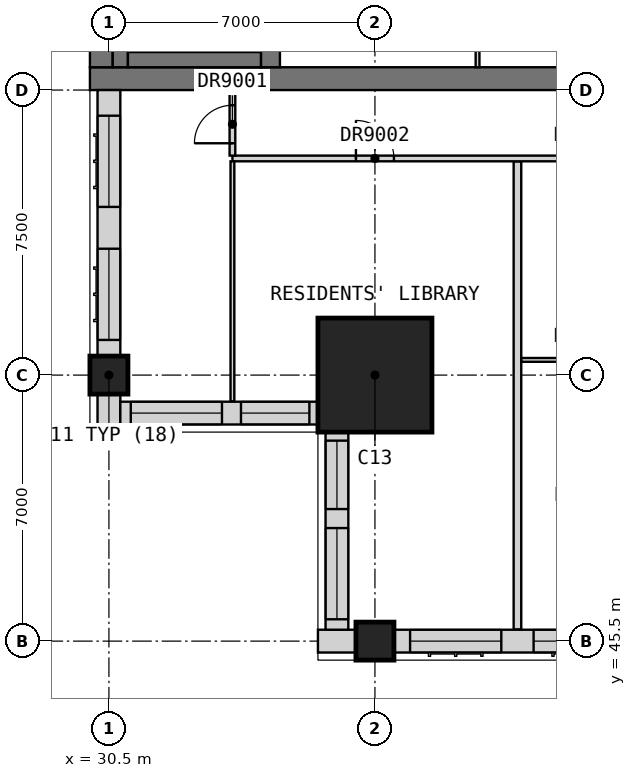
"""IFC4 building model, lengths in metres.
Left out: names, types, materials, properties, quantities, classifications, styles, units other than length and angle.
Written with IfcOpenShell. Run it as: python <this file> out.ifc"""

import sys

from ifc_helpers import new_model, si_unit, direction, frame, frame_2d, origin, origin_2d, place, context, subcontext, project, spatial, rectangle, extrude, element, fill, save


model = new_model("IFC4")
c1 = context("Model", 3, precision=1e-05, world=origin(), true_north=direction((0.0, 1.0)))
c2 = subcontext(c1, "Body", "Model", "MODEL_VIEW")
j1 = project(units=[si_unit("LENGTHUNIT", "METRE"), si_unit("PLANEANGLEUNIT", "RADIAN")], contexts=[c1])
p1 = place(None, origin())
s1 = spatial("IfcSite", under=j1, at=p1, CompositionType="ELEMENT")
p2 = place(p1, origin())
s2 = spatial("IfcBuilding", under=s1, at=p2, CompositionType="ELEMENT")
p3 = place(p2, frame((0.0, 0.0, 280.2)))
s3 = spatial("IfcBuildingStorey", under=s2, at=p3, CompositionType="ELEMENT", Elevation=280.2)
for number, where, z_axis, x_axis in (
    (1, (30.5, 52.5, 0.0), (0.0, 0.0, 1.0), (1.0, 0.0, 0.0)),
    (2, (37.5, 45.5, 0.0), (0.0, 0.0, 1.0), (1.0, 0.0, 0.0)),
):
    element("IfcColumn", number, at=place(p3, frame(where, z_axis=z_axis, x_axis=x_axis)), inside=s3, PredefinedType="COLUMN", context=c2, shape_type="SweptSolid", body=[
        extrude(rectangle(XDim=1.0, YDim=1.0, at=origin_2d()), origin(), (0.0, 0.0, 1.0), 3.5),
    ])
p4 = place(p3, frame((37.5, 52.5, 0.0), z_axis=(0.0, 0.0, 1.0), x_axis=(1.0, 0.0, 0.0)))
e3 = element("IfcColumn", 3, at=p4, inside=s3, PredefinedType="COLUMN", context=c2, shape_type="SweptSolid", body=[
    extrude(rectangle(XDim=3.0, YDim=3.0, at=origin_2d()), origin(), (0.0, 0.0, 1.0), 3.5),
])
p5 = place(p3, frame((30.0, 60.3, 0.0), z_axis=(0.0, 0.0, 1.0), x_axis=(1.0, 0.0, 0.0)))
e4 = element("IfcWall", 4, at=p5, inside=s3, PredefinedType="SHEAR", context=c2, shape_type="SweptSolid", body=[
    extrude(rectangle(XDim=30.0, YDim=0.6, at=frame_2d((15.0, 0.0))), origin(), (0.0, 0.0, 1.0), 3.5),
])
p6 = place(p5, frame((21.9, 0.0, 0.0)))
e5 = element("IfcOpeningElement", 5, at=p6, cuts=e4, PredefinedType="OPENING", context=c2, shape_type="SweptSolid", body=[
    extrude(rectangle(XDim=1.8, YDim=2.1, at=frame_2d((0.9, 1.05))), frame((0.0, 0.31, 0.0), z_axis=(0.0, -1.0, 0.0), x_axis=(1.0, 0.0, 0.0)), (0.0, 0.0, 1.0), 0.62),
])
p7 = place(p5, frame((26.5, 0.0, 0.0)))
e6 = element("IfcOpeningElement", 6, at=p7, cuts=e4, PredefinedType="OPENING", context=c2, shape_type="SweptSolid", body=[
    extrude(rectangle(XDim=1.2, YDim=2.1, at=frame_2d((0.6, 1.05))), frame((0.0, 0.31, 0.0), z_axis=(0.0, -1.0, 0.0), x_axis=(1.0, 0.0, 0.0)), (0.0, 0.0, 1.0), 0.62),
])
p8 = place(p3, frame((30.3, 60.6, 0.0), z_axis=(0.0, 0.0, 1.0), x_axis=(0.0, 1.0, 0.0)))
e7 = element("IfcWall", 7, at=p8, inside=s3, PredefinedType="SHEAR", context=c2, shape_type="SweptSolid", body=[
    extrude(rectangle(XDim=21.3, YDim=0.6, at=frame_2d((10.65, 0.0))), origin(), (0.0, 0.0, 1.0), 3.5),
])
p9 = place(p3, frame((34.75, 60.6, 0.0), z_axis=(0.0, 0.0, 1.0), x_axis=(0.0, 1.0, 0.0)))
e8 = element("IfcWall", 8, at=p9, inside=s3, PredefinedType="SHEAR", context=c2, shape_type="SweptSolid", body=[
    extrude(rectangle(XDim=3.6, YDim=0.5, at=frame_2d((1.8, 0.0))), origin(), (0.0, 0.0, 1.0), 3.5),
])
p10 = place(p3, frame((36.0, 45.5, 0.0), z_axis=(0.0, 0.0, 1.0), x_axis=(1.0, 0.0, 0.0)))
e9 = element("IfcWall", 9, at=p10, inside=s3, PredefinedType="SOLIDWALL", context=c2, shape_type="SweptSolid", body=[
    extrude(rectangle(XDim=1.0, YDim=0.6, at=frame_2d((0.5, 0.0))), origin(), (0.0, 0.0, 1.0), 3.25),
])
p11 = place(p3, frame((38.0, 45.5, 0.0), z_axis=(0.0, 0.0, 1.0), x_axis=(1.0, 0.0, 0.0)))
e10 = element("IfcWall", 10, at=p11, inside=s3, PredefinedType="SOLIDWALL", context=c2, shape_type="SweptSolid", body=[
    extrude(rectangle(XDim=6.5, YDim=0.6, at=frame_2d((3.25, 0.0))), origin(), (0.0, 0.0, 1.0), 2.75),
])
p12 = place(p11, frame((0.425, 0.0, 0.8)))
e11 = element("IfcOpeningElement", 11, at=p12, cuts=e10, PredefinedType="OPENING", context=c2, shape_type="SweptSolid", body=[
    extrude(rectangle(XDim=2.4, YDim=1.8, at=frame_2d((1.2, 0.9))), frame((0.0, 0.31, 0.0), z_axis=(0.0, -1.0, 0.0), x_axis=(1.0, 0.0, 0.0)), (0.0, 0.0, 1.0), 0.62),
])
p13 = place(p11, frame((3.675, 0.0, 0.8)))
e12 = element("IfcOpeningElement", 12, at=p13, cuts=e10, PredefinedType="OPENING", context=c2, shape_type="SweptSolid", body=[
    extrude(rectangle(XDim=2.4, YDim=1.8, at=frame_2d((1.2, 0.9))), frame((0.0, 0.31, 0.0), z_axis=(0.0, -1.0, 0.0), x_axis=(1.0, 0.0, 0.0)), (0.0, 0.0, 1.0), 0.62),
])
p14 = place(p3, frame((30.5, 60.0, 0.0), z_axis=(0.0, 0.0, 1.0), x_axis=(0.0, -1.0, 0.0)))
e13 = element("IfcWall", 13, at=p14, inside=s3, PredefinedType="SOLIDWALL", context=c2, shape_type="SweptSolid", body=[
    extrude(rectangle(XDim=7.0, YDim=0.6, at=frame_2d((3.5, 0.0))), origin(), (0.0, 0.0, 1.0), 3.25),
])
p15 = place(p14, frame((4.175, 0.0, 0.8)))
e14 = element("IfcOpeningElement", 14, at=p15, cuts=e13, PredefinedType="OPENING", context=c2, shape_type="SweptSolid", body=[
    extrude(rectangle(XDim=2.4, YDim=1.8, at=frame_2d((1.2, 0.9))), frame((0.0, 0.31, 0.0), z_axis=(0.0, -1.0, 0.0), x_axis=(1.0, 0.0, 0.0)), (0.0, 0.0, 1.0), 0.62),
])
p16 = place(p14, frame((0.675, 0.0, 0.8)))
e15 = element("IfcOpeningElement", 15, at=p16, cuts=e13, PredefinedType="OPENING", context=c2, shape_type="SweptSolid", body=[
    extrude(rectangle(XDim=2.4, YDim=1.8, at=frame_2d((1.2, 0.9))), frame((0.0, 0.31, 0.0), z_axis=(0.0, -1.0, 0.0), x_axis=(1.0, 0.0, 0.0)), (0.0, 0.0, 1.0), 0.62),
])
p17 = place(p3, frame((30.5, 52.0, 0.0), z_axis=(0.0, 0.0, 1.0), x_axis=(0.0, -1.0, 0.0)))
e16 = element("IfcWall", 16, at=p17, inside=s3, PredefinedType="SOLIDWALL", context=c2, shape_type="SweptSolid", body=[
    extrude(rectangle(XDim=1.0, YDim=0.6, at=frame_2d((0.5, 0.0))), origin(), (0.0, 0.0, 1.0), 3.25),
])
p18 = place(p3, frame((30.8, 51.5, 0.0), z_axis=(0.0, 0.0, 1.0), x_axis=(1.0, 0.0, 0.0)))
e17 = element("IfcWall", 17, at=p18, inside=s3, PredefinedType="SOLIDWALL", context=c2, shape_type="SweptSolid", body=[
    extrude(rectangle(XDim=5.2, YDim=0.6, at=frame_2d((2.6, 0.0))), origin(), (0.0, 0.0, 1.0), 3.25),
])
p19 = place(p18, frame((0.275, 0.0, 0.8)))
e18 = element("IfcOpeningElement", 18, at=p19, cuts=e17, PredefinedType="OPENING", context=c2, shape_type="SweptSolid", body=[
    extrude(rectangle(XDim=2.4, YDim=1.8, at=frame_2d((1.2, 0.9))), frame((0.0, 0.31, 0.0), z_axis=(0.0, -1.0, 0.0), x_axis=(1.0, 0.0, 0.0)), (0.0, 0.0, 1.0), 0.62),
])
p20 = place(p18, frame((3.175, 0.0, 0.8)))
e19 = element("IfcOpeningElement", 19, at=p20, cuts=e17, PredefinedType="OPENING", context=c2, shape_type="SweptSolid", body=[
    extrude(rectangle(XDim=1.8, YDim=1.8, at=frame_2d((0.9, 0.9))), frame((0.0, 0.31, 0.0), z_axis=(0.0, -1.0, 0.0), x_axis=(1.0, 0.0, 0.0)), (0.0, 0.0, 1.0), 0.62),
])
p21 = place(p3, frame((36.5, 51.0, 0.0), z_axis=(0.0, 0.0, 1.0), x_axis=(0.0, -1.0, 0.0)))
e20 = element("IfcWall", 20, at=p21, inside=s3, PredefinedType="SOLIDWALL", context=c2, shape_type="SweptSolid", body=[
    extrude(rectangle(XDim=5.2, YDim=0.6, at=frame_2d((2.6, 0.0))), origin(), (0.0, 0.0, 1.0), 3.25),
])
p22 = place(p21, frame((2.525, 0.0, 0.8)))
e21 = element("IfcOpeningElement", 21, at=p22, cuts=e20, PredefinedType="OPENING", context=c2, shape_type="SweptSolid", body=[
    extrude(rectangle(XDim=2.4, YDim=1.8, at=frame_2d((1.2, 0.9))), frame((0.0, 0.31, 0.0), z_axis=(0.0, -1.0, 0.0), x_axis=(1.0, 0.0, 0.0)), (0.0, 0.0, 1.0), 0.62),
])
p23 = place(p21, frame((0.225, 0.0, 0.8)))
e22 = element("IfcOpeningElement", 22, at=p23, cuts=e20, PredefinedType="OPENING", context=c2, shape_type="SweptSolid", body=[
    extrude(rectangle(XDim=1.8, YDim=1.8, at=frame_2d((0.9, 0.9))), frame((0.0, 0.31, 0.0), z_axis=(0.0, -1.0, 0.0), x_axis=(1.0, 0.0, 0.0)), (0.0, 0.0, 1.0), 0.62),
])
p24 = place(p3, frame((40.2, 60.6, 0.0), z_axis=(0.0, 0.0, 1.0), x_axis=(0.0, 1.0, 0.0)))
e23 = element("IfcWall", 23, at=p24, inside=s3, PredefinedType="PARTITIONING", context=c2, shape_type="SweptSolid", body=[
    extrude(rectangle(XDim=3.4, YDim=0.1, at=frame_2d((1.7, 0.0))), origin(), (0.0, 0.0, 1.0), 3.25),
])
p25 = place(p3, frame((30.8, 60.6, 0.0), z_axis=(0.0, 0.0, 1.0), x_axis=(0.0, 1.0, 0.0)))
e24 = element("IfcWall", 24, at=p25, inside=s3, PredefinedType="SOLIDWALL", context=c2, shape_type="SweptSolid", body=[
    extrude(rectangle(XDim=21.3, YDim=0.4, at=frame_2d((10.65, 0.0))), origin(), (0.0, 0.0, 1.0), 3.25),
])
p26 = place(p3, frame((31.0, 60.8, 0.0), z_axis=(0.0, 0.0, 1.0), x_axis=(1.0, 0.0, 0.0)))
e25 = element("IfcWall", 25, at=p26, inside=s3, PredefinedType="SOLIDWALL", context=c2, shape_type="SweptSolid", body=[
    extrude(rectangle(XDim=3.5, YDim=0.4, at=frame_2d((1.75, 0.0))), origin(), (0.0, 0.0, 1.0), 3.25),
])
p27 = place(p3, frame((41.25, 45.81, 0.0), z_axis=(0.0, 0.0, 1.0), x_axis=(0.0, 1.0, 0.0)))
e26 = element("IfcWall", 26, at=p27, inside=s3, PredefinedType="PARTITIONING", context=c2, shape_type="SweptSolid", body=[
    extrude(rectangle(XDim=12.315, YDim=0.2, at=frame_2d((6.157, 0.0))), origin(), (0.0, 0.0, 1.0), 3.25),
])
p28 = place(p3, frame((33.75, 58.2, 0.0), z_axis=(0.0, 0.0, 1.0), x_axis=(1.0, 0.0, 0.0)))
e27 = element("IfcWall", 27, at=p28, inside=s3, PredefinedType="PARTITIONING", context=c2, shape_type="SweptSolid", body=[
    extrude(rectangle(XDim=28.05, YDim=0.15, at=frame_2d((14.025, 0.0))), origin(), (0.0, 0.0, 1.0), 3.25),
])
p29 = place(p28, frame((3.25, 0.0, 0.0)))
e28 = element("IfcOpeningElement", 28, at=p29, cuts=e27, PredefinedType="OPENING", context=c2, shape_type="SweptSolid", body=[
    extrude(rectangle(XDim=1.0, YDim=2.1, at=frame_2d((0.5, 1.05))), frame((0.0, 0.085, 0.0), z_axis=(0.0, -1.0, 0.0), x_axis=(1.0, 0.0, 0.0)), (0.0, 0.0, 1.0), 0.17),
])
p30 = place(p28, frame((8.925, 0.0, 0.0)))
e29 = element("IfcOpeningElement", 29, at=p30, cuts=e27, PredefinedType="OPENING", context=c2, shape_type="SweptSolid", body=[
    extrude(rectangle(XDim=0.9, YDim=2.1, at=frame_2d((0.45, 1.05))), frame((0.0, 0.085, 0.0), z_axis=(0.0, -1.0, 0.0), x_axis=(1.0, 0.0, 0.0)), (0.0, 0.0, 1.0), 0.17),
])
p31 = place(p28, frame((20.175, 0.0, 0.0)))
e30 = element("IfcOpeningElement", 30, at=p31, cuts=e27, PredefinedType="OPENING", context=c2, shape_type="SweptSolid", body=[
    extrude(rectangle(XDim=0.9, YDim=2.1, at=frame_2d((0.45, 1.05))), frame((0.0, 0.085, 0.0), z_axis=(0.0, -1.0, 0.0), x_axis=(1.0, 0.0, 0.0)), (0.0, 0.0, 1.0), 0.17),
])
p32 = place(p28, frame((26.65, 0.0, 0.0)))
e31 = element("IfcOpeningElement", 31, at=p32, cuts=e27, PredefinedType="OPENING", context=c2, shape_type="SweptSolid", body=[
    extrude(rectangle(XDim=1.0, YDim=2.1, at=frame_2d((0.5, 1.05))), frame((0.0, 0.085, 0.0), z_axis=(0.0, -1.0, 0.0), x_axis=(1.0, 0.0, 0.0)), (0.0, 0.0, 1.0), 0.17),
])
p33 = place(p3, frame((33.75, 58.275, 0.0), z_axis=(0.0, 0.0, 1.0), x_axis=(0.0, 1.0, 0.0)))
e32 = element("IfcWall", 32, at=p33, inside=s3, PredefinedType="PARTITIONING", context=c2, shape_type="SweptSolid", body=[
    extrude(rectangle(XDim=1.725, YDim=0.15, at=frame_2d((0.863, 0.0))), origin(), (0.0, 0.0, 1.0), 3.25),
])
p34 = place(p33, frame((0.325, 0.0, 0.0)))
e33 = element("IfcOpeningElement", 33, at=p34, cuts=e32, PredefinedType="OPENING", context=c2, shape_type="SweptSolid", body=[
    extrude(rectangle(XDim=1.0, YDim=2.1, at=frame_2d((0.5, 1.05))), frame((0.0, 0.085, 0.0), z_axis=(0.0, -1.0, 0.0), x_axis=(1.0, 0.0, 0.0)), (0.0, 0.0, 1.0), 0.17),
])
p35 = place(p3, frame((41.35, 52.9, 0.0), z_axis=(0.0, 0.0, 1.0), x_axis=(1.0, 0.0, 0.0)))
e34 = element("IfcWall", 34, at=p35, inside=s3, PredefinedType="PARTITIONING", context=c2, shape_type="SweptSolid", body=[
    extrude(rectangle(XDim=18.55, YDim=0.1, at=frame_2d((9.275, 0.0))), origin(), (0.0, 0.0, 1.0), 3.25),
])
p36 = place(p35, frame((1.325, 0.0, 0.0)))
e35 = element("IfcOpeningElement", 35, at=p36, cuts=e34, PredefinedType="OPENING", context=c2, shape_type="SweptSolid", body=[
    extrude(rectangle(XDim=0.9, YDim=2.1, at=frame_2d((0.45, 1.05))), frame((0.0, 0.06, 0.0), z_axis=(0.0, -1.0, 0.0), x_axis=(1.0, 0.0, 0.0)), (0.0, 0.0, 1.0), 0.12),
])
p37 = place(p35, frame((8.825, 0.0, 0.0)))
e36 = element("IfcOpeningElement", 36, at=p37, cuts=e34, PredefinedType="OPENING", context=c2, shape_type="SweptSolid", body=[
    extrude(rectangle(XDim=0.9, YDim=2.1, at=frame_2d((0.45, 1.05))), frame((0.0, 0.06, 0.0), z_axis=(0.0, -1.0, 0.0), x_axis=(1.0, 0.0, 0.0)), (0.0, 0.0, 1.0), 0.12),
])
p38 = place(p35, frame((12.575, 0.0, 0.0)))
e37 = element("IfcOpeningElement", 37, at=p38, cuts=e34, PredefinedType="OPENING", context=c2, shape_type="SweptSolid", body=[
    extrude(rectangle(XDim=0.9, YDim=2.1, at=frame_2d((0.45, 1.05))), frame((0.0, 0.06, 0.0), z_axis=(0.0, -1.0, 0.0), x_axis=(1.0, 0.0, 0.0)), (0.0, 0.0, 1.0), 0.12),
])
p39 = place(p3, frame((33.75, 51.81, 0.0), z_axis=(0.0, 0.0, 1.0), x_axis=(0.0, 1.0, 0.0)))
e38 = element("IfcWall", 38, at=p39, inside=s3, PredefinedType="PARTITIONING", context=c2, shape_type="SweptSolid", body=[
    extrude(rectangle(XDim=6.315, YDim=0.1, at=frame_2d((3.157, 0.0))), origin(), (0.0, 0.0, 1.0), 3.25),
])
p40 = place(p12, origin())
e39 = element("IfcWindow", 39, at=p40, inside=s3, PartitioningType="SINGLE_PANEL", PredefinedType="WINDOW", context=c2, shape_type="SweptSolid", body=[
    extrude(rectangle(XDim=2.4, YDim=1.8, at=frame_2d((1.2, 0.9))), frame((0.0, -0.07, 0.0), z_axis=(0.0, -1.0, 0.0), x_axis=(1.0, 0.0, 0.0)), (0.0, 0.0, 1.0), 0.06),
])
fill(e11, e39)
p41 = place(p13, origin())
e40 = element("IfcWindow", 40, at=p41, inside=s3, PartitioningType="SINGLE_PANEL", PredefinedType="WINDOW", context=c2, shape_type="SweptSolid", body=[
    extrude(rectangle(XDim=2.4, YDim=1.8, at=frame_2d((1.2, 0.9))), frame((0.0, -0.07, 0.0), z_axis=(0.0, -1.0, 0.0), x_axis=(1.0, 0.0, 0.0)), (0.0, 0.0, 1.0), 0.06),
])
fill(e12, e40)
p42 = place(p15, origin())
e41 = element("IfcWindow", 41, at=p42, inside=s3, PartitioningType="SINGLE_PANEL", PredefinedType="WINDOW", context=c2, shape_type="SweptSolid", body=[
    extrude(rectangle(XDim=2.4, YDim=1.8, at=frame_2d((1.2, 0.9))), frame((0.0, -0.07, 0.0), z_axis=(0.0, -1.0, 0.0), x_axis=(1.0, 0.0, 0.0)), (0.0, 0.0, 1.0), 0.06),
])
fill(e14, e41)
p43 = place(p16, origin())
e42 = element("IfcWindow", 42, at=p43, inside=s3, PartitioningType="SINGLE_PANEL", PredefinedType="WINDOW", context=c2, shape_type="SweptSolid", body=[
    extrude(rectangle(XDim=2.4, YDim=1.8, at=frame_2d((1.2, 0.9))), frame((0.0, -0.07, 0.0), z_axis=(0.0, -1.0, 0.0), x_axis=(1.0, 0.0, 0.0)), (0.0, 0.0, 1.0), 0.06),
])
fill(e15, e42)
p44 = place(p19, origin())
e43 = element("IfcWindow", 43, at=p44, inside=s3, PartitioningType="SINGLE_PANEL", PredefinedType="WINDOW", context=c2, shape_type="SweptSolid", body=[
    extrude(rectangle(XDim=2.4, YDim=1.8, at=frame_2d((1.2, 0.9))), frame((0.0, -0.07, 0.0), z_axis=(0.0, -1.0, 0.0), x_axis=(1.0, 0.0, 0.0)), (0.0, 0.0, 1.0), 0.06),
])
fill(e18, e43)
p45 = place(p20, origin())
e44 = element("IfcWindow", 44, at=p45, inside=s3, PartitioningType="SINGLE_PANEL", PredefinedType="WINDOW", context=c2, shape_type="SweptSolid", body=[
    extrude(rectangle(XDim=1.8, YDim=1.8, at=frame_2d((0.9, 0.9))), frame((0.0, -0.07, 0.0), z_axis=(0.0, -1.0, 0.0), x_axis=(1.0, 0.0, 0.0)), (0.0, 0.0, 1.0), 0.06),
])
fill(e19, e44)
p46 = place(p22, origin())
e45 = element("IfcWindow", 45, at=p46, inside=s3, PartitioningType="SINGLE_PANEL", PredefinedType="WINDOW", context=c2, shape_type="SweptSolid", body=[
    extrude(rectangle(XDim=2.4, YDim=1.8, at=frame_2d((1.2, 0.9))), frame((0.0, -0.07, 0.0), z_axis=(0.0, -1.0, 0.0), x_axis=(1.0, 0.0, 0.0)), (0.0, 0.0, 1.0), 0.06),
])
fill(e21, e45)
p47 = place(p23, origin())
e46 = element("IfcWindow", 46, at=p47, inside=s3, PartitioningType="SINGLE_PANEL", PredefinedType="WINDOW", context=c2, shape_type="SweptSolid", body=[
    extrude(rectangle(XDim=1.8, YDim=1.8, at=frame_2d((0.9, 0.9))), frame((0.0, -0.07, 0.0), z_axis=(0.0, -1.0, 0.0), x_axis=(1.0, 0.0, 0.0)), (0.0, 0.0, 1.0), 0.06),
])
fill(e22, e46)
p48 = place(p34, origin())
e47 = element("IfcDoor", 47, at=p48, inside=s3, OperationType="SINGLE_SWING_RIGHT", PredefinedType="DOOR", context=c2, shape_type="SweptSolid", body=[
    extrude(rectangle(XDim=1.0, YDim=2.1, at=frame_2d((0.5, 1.05))), frame((0.0, 0.025, 0.0), z_axis=(0.0, -1.0, 0.0), x_axis=(1.0, 0.0, 0.0)), (0.0, 0.0, 1.0), 0.05),
])
fill(e33, e47)
p49 = place(p29, origin())
e48 = element("IfcDoor", 48, at=p49, inside=s3, OperationType="SINGLE_SWING_RIGHT", PredefinedType="DOOR", context=c2, shape_type="SweptSolid", body=[
    extrude(rectangle(XDim=1.0, YDim=2.1, at=frame_2d((0.5, 1.05))), frame((0.0, 0.025, 0.0), z_axis=(0.0, -1.0, 0.0), x_axis=(1.0, 0.0, 0.0)), (0.0, 0.0, 1.0), 0.05),
])
fill(e28, e48)
save(model, sys.argv[1])
